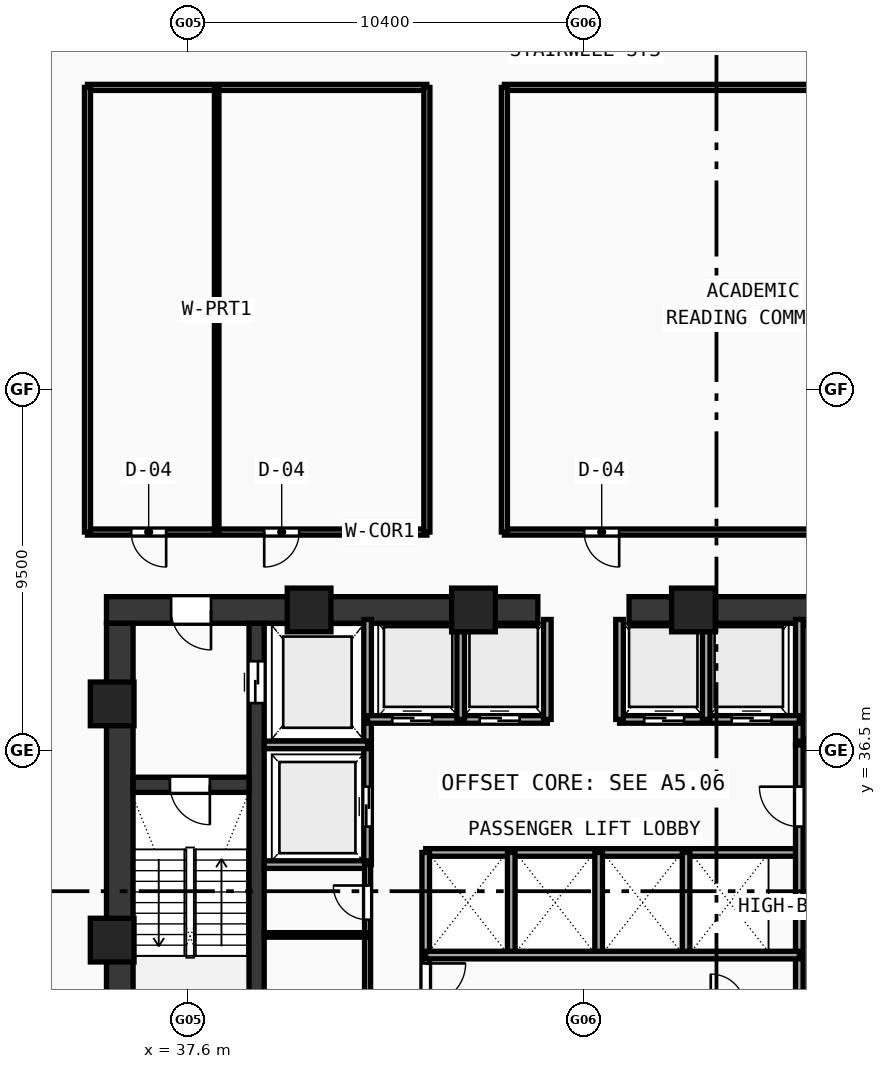
"""IFC4 building model, lengths in metres.
Left out: names, types, materials, properties, quantities, classifications, styles, units other than length and angle.
Written with IfcOpenShell. Run it as: python <this file> out.ifc"""

import sys

from ifc_helpers import new_model, si_unit, direction, frame, frame_2d, origin, origin_with_axes, origin_2d, place, context, subcontext, project, spatial, rectangle, hollow_rectangle, extrude, source, transform, mapped, element, fill, save


model = new_model("IFC4")
c1 = context("Model", 3, precision=1e-05, world=origin(), true_north=direction((0.0, 1.0)))
c2 = subcontext(c1, "Body", "Model", "MODEL_VIEW")
j1 = project(units=[si_unit("LENGTHUNIT", "METRE"), si_unit("PLANEANGLEUNIT", "RADIAN")], contexts=[c1])
p1 = place(None, origin())
s1 = spatial("IfcSite", under=j1, at=p1, CompositionType="ELEMENT")
p2 = place(p1, origin())
s2 = spatial("IfcBuilding", under=s1, at=p2, CompositionType="ELEMENT")
p3 = place(p2, frame((0.0, 0.0, 63.07)))
s3 = spatial("IfcBuildingStorey", under=s2, at=p3, CompositionType="ELEMENT", Elevation=63.07)
p4 = place(p3, frame((35.45, 40.2, 0.0), z_axis=(0.0, 0.0, 1.0), x_axis=(1.0, 0.0, 0.0)))
e1 = element("IfcWall", 1, at=p4, inside=s3, PredefinedType="SHEAR", context=c2, shape_type="SweptSolid", body=[
    extrude(rectangle(XDim=11.35, YDim=0.7, at=frame_2d((5.675, 0.0))), origin(), (0.0, 0.0, 1.0), 3.37),
])
p5 = place(p4, frame((1.7, 0.0, 0.0)))
e2 = element("IfcOpeningElement", 2, at=p5, cuts=e1, PredefinedType="OPENING", context=c2, shape_type="SweptSolid", body=[
    extrude(rectangle(XDim=1.05, YDim=2.1, at=frame_2d((0.525, 1.05))), frame((0.0, 0.36, 0.0), z_axis=(0.0, -1.0, 0.0), x_axis=(1.0, 0.0, 0.0)), (0.0, 0.0, 1.0), 0.72),
])
p6 = place(p3, frame((49.2, 40.2, 0.0), z_axis=(0.0, 0.0, 1.0), x_axis=(1.0, 0.0, 0.0)))
e3 = element("IfcWall", 3, at=p6, inside=s3, PredefinedType="SHEAR", context=c2, shape_type="SweptSolid", body=[
    extrude(rectangle(XDim=11.35, YDim=0.7, at=frame_2d((5.675, 0.0))), origin(), (0.0, 0.0, 1.0), 3.37),
])
p7 = place(p6, frame((8.6, 0.0, 0.0)))
e4 = element("IfcOpeningElement", 4, at=p7, cuts=e3, PredefinedType="OPENING", context=c2, shape_type="SweptSolid", body=[
    extrude(rectangle(XDim=1.05, YDim=2.1, at=frame_2d((0.525, 1.05))), frame((0.0, 0.36, 0.0), z_axis=(0.0, -1.0, 0.0), x_axis=(1.0, 0.0, 0.0)), (0.0, 0.0, 1.0), 0.72),
])
p8 = place(p3, frame((35.8, 27.85, 0.0), z_axis=(0.0, 0.0, 1.0), x_axis=(0.0, 1.0, 0.0)))
e5 = element("IfcWall", 5, at=p8, inside=s3, PredefinedType="SHEAR", context=c2, shape_type="SweptSolid", body=[
    extrude(rectangle(XDim=12.0, YDim=0.7, at=frame_2d((6.0, 0.0))), origin(), (0.0, 0.0, 1.0), 3.37),
])
p9 = place(p3, frame((39.4, 27.85, 0.0), z_axis=(0.0, 0.0, 1.0), x_axis=(0.0, 1.0, 0.0)))
e6 = element("IfcWall", 6, at=p9, inside=s3, PredefinedType="SHEAR", context=c2, shape_type="SweptSolid", body=[
    extrude(rectangle(XDim=12.0, YDim=0.4, at=frame_2d((6.0, 0.0))), origin(), (0.0, 0.0, 1.0), 3.37),
])
p10 = place(p9, frame((9.9, 0.0, 0.0)))
e7 = element("IfcOpeningElement", 7, at=p10, cuts=e6, PredefinedType="OPENING", context=c2, shape_type="SweptSolid", body=[
    extrude(rectangle(XDim=1.1, YDim=2.1, at=frame_2d((0.55, 1.05))), frame((0.0, 0.21, 0.0), z_axis=(0.0, -1.0, 0.0), x_axis=(1.0, 0.0, 0.0)), (0.0, 0.0, 1.0), 0.42),
])
p11 = place(p3, frame((36.15, 35.6, 0.0), z_axis=(0.0, 0.0, 1.0), x_axis=(1.0, 0.0, 0.0)))
e8 = element("IfcWall", 8, at=p11, inside=s3, PredefinedType="SHEAR", context=c2, shape_type="SweptSolid", body=[
    extrude(rectangle(XDim=3.05, YDim=0.4, at=frame_2d((1.525, 0.0))), origin(), (0.0, 0.0, 1.0), 3.37),
])
p12 = place(p11, frame((0.97, 0.0, 0.0)))
e9 = element("IfcOpeningElement", 9, at=p12, cuts=e8, PredefinedType="OPENING", context=c2, shape_type="SweptSolid", body=[
    extrude(rectangle(XDim=1.05, YDim=2.1, at=frame_2d((0.525, 1.05))), frame((0.0, 0.21, 0.0), z_axis=(0.0, -1.0, 0.0), x_axis=(1.0, 0.0, 0.0)), (0.0, 0.0, 1.0), 0.42),
])
m1 = source(origin(), c2, "Body", "SweptSolid", [
    extrude(hollow_rectangle(XDim=1.15, YDim=1.15, WallThickness=0.048, at=origin_2d()), origin(), (0.0, 0.0, 1.0), 3.63),
])
for number, where, z_axis, x_axis in (
    (10, (50.894, 40.2, -0.26), (0.0, 0.0, 1.0), (1.0, 0.0, 0.0)),
    (11, (45.106, 40.2, -0.26), (0.0, 0.0, 1.0), (1.0, 0.0, 0.0)),
    (12, (40.781, 40.2, -0.26), (0.0, 0.0, 1.0), (1.0, 0.0, 0.0)),
    (13, (35.6, 37.729, -0.26), (0.0, 0.0, 1.0), (1.0, 0.0, 0.0)),
    (14, (35.6, 31.513, -0.26), (0.0, 0.0, 1.0), (1.0, 0.0, 0.0)),
):
    element("IfcColumn", number, at=place(p3, frame(where, z_axis=z_axis, x_axis=x_axis)), inside=s3, PredefinedType="COLUMN", context=c2, shape_type="MappedRepresentation", body=[
        mapped(m1, transform((0.0, 0.0, 0.0), scale=1.0)),
    ])
p13 = place(p3, frame((42.32, 33.5, 0.0), z_axis=(0.0, 0.0, 1.0), x_axis=(0.0, 1.0, 0.0)))
e15 = element("IfcWall", 15, at=p13, inside=s3, PredefinedType="SOLIDWALL", context=c2, shape_type="SweptSolid", body=[
    extrude(rectangle(XDim=6.45, YDim=0.2, at=frame_2d((3.225, 0.0))), origin(), (0.0, 0.0, 1.0), 3.37),
])
p14 = place(p13, frame((1.0, 0.0, 0.0)))
e16 = element("IfcOpeningElement", 16, at=p14, cuts=e15, PredefinedType="OPENING", context=c2, shape_type="SweptSolid", body=[
    extrude(rectangle(XDim=1.05, YDim=2.1, at=frame_2d((0.525, 1.05))), frame((0.0, 0.11, 0.0), z_axis=(0.0, -1.0, 0.0), x_axis=(1.0, 0.0, 0.0)), (0.0, 0.0, 1.0), 0.22),
])
for number, where, z_axis, x_axis in (
    (17, (39.6, 36.65, 0.0), (0.0, 0.0, 1.0), (1.0, 0.0, 0.0)),
    (18, (39.6, 33.5, 0.0), (0.0, 0.0, 1.0), (1.0, 0.0, 0.0)),
):
    element("IfcWall", number, at=place(p3, frame(where, z_axis=z_axis, x_axis=x_axis)), inside=s3, PredefinedType="SOLIDWALL", context=c2, shape_type="SweptSolid", body=[
        extrude(rectangle(XDim=2.72, YDim=0.2, at=frame_2d((1.36, 0.0))), origin(), (0.0, 0.0, 1.0), 3.37),
    ])
p15 = place(p3, frame((53.68, 36.65, 0.0), z_axis=(0.0, 0.0, 1.0), x_axis=(0.0, 1.0, 0.0)))
e19 = element("IfcWall", 19, at=p15, inside=s3, PredefinedType="SOLIDWALL", context=c2, shape_type="SweptSolid", body=[
    extrude(rectangle(XDim=3.3, YDim=0.2, at=frame_2d((1.65, 0.0))), origin(), (0.0, 0.0, 1.0), 3.37),
])
p16 = place(p3, frame((53.68, 36.65, 0.0), z_axis=(0.0, 0.0, 1.0), x_axis=(1.0, 0.0, 0.0)))
e20 = element("IfcWall", 20, at=p16, inside=s3, PredefinedType="SOLIDWALL", context=c2, shape_type="SweptSolid", body=[
    extrude(rectangle(XDim=2.72, YDim=0.2, at=frame_2d((1.36, 0.0))), origin(), (0.0, 0.0, 1.0), 3.37),
])
p17 = place(p3, frame((42.32, 37.32, 0.0), z_axis=(0.0, 0.0, 1.0), x_axis=(1.0, 0.0, 0.0)))
e21 = element("IfcWall", 21, at=p17, inside=s3, PredefinedType="SOLIDWALL", context=c2, shape_type="SweptSolid", body=[
    extrude(rectangle(XDim=4.73, YDim=0.2, at=frame_2d((2.365, 0.0))), origin(), (0.0, 0.0, 1.0), 3.37),
])
p18 = place(p17, frame((0.65, 0.0, 0.0)))
e22 = element("IfcOpeningElement", 22, at=p18, cuts=e21, PredefinedType="OPENING", context=c2, shape_type="SweptSolid", body=[
    extrude(rectangle(XDim=1.05, YDim=2.1, at=frame_2d((0.525, 1.05))), frame((0.0, 0.11, 0.0), z_axis=(0.0, -1.0, 0.0), x_axis=(1.0, 0.0, 0.0)), (0.0, 0.0, 1.0), 0.22),
])
p19 = place(p17, frame((2.95, 0.0, 0.0)))
e23 = element("IfcOpeningElement", 23, at=p19, cuts=e21, PredefinedType="OPENING", context=c2, shape_type="SweptSolid", body=[
    extrude(rectangle(XDim=1.05, YDim=2.1, at=frame_2d((0.525, 1.05))), frame((0.0, 0.11, 0.0), z_axis=(0.0, -1.0, 0.0), x_axis=(1.0, 0.0, 0.0)), (0.0, 0.0, 1.0), 0.22),
])
p20 = place(p3, frame((48.95, 37.32, 0.0), z_axis=(0.0, 0.0, 1.0), x_axis=(1.0, 0.0, 0.0)))
e24 = element("IfcWall", 24, at=p20, inside=s3, PredefinedType="SOLIDWALL", context=c2, shape_type="SweptSolid", body=[
    extrude(rectangle(XDim=4.73, YDim=0.2, at=frame_2d((2.365, 0.0))), origin(), (0.0, 0.0, 1.0), 3.37),
])
p21 = place(p20, frame((0.65, 0.0, 0.0)))
e25 = element("IfcOpeningElement", 25, at=p21, cuts=e24, PredefinedType="OPENING", context=c2, shape_type="SweptSolid", body=[
    extrude(rectangle(XDim=1.05, YDim=2.1, at=frame_2d((0.525, 1.05))), frame((0.0, 0.11, 0.0), z_axis=(0.0, -1.0, 0.0), x_axis=(1.0, 0.0, 0.0)), (0.0, 0.0, 1.0), 0.22),
])
p22 = place(p20, frame((2.95, 0.0, 0.0)))
e26 = element("IfcOpeningElement", 26, at=p22, cuts=e24, PredefinedType="OPENING", context=c2, shape_type="SweptSolid", body=[
    extrude(rectangle(XDim=1.05, YDim=2.1, at=frame_2d((0.525, 1.05))), frame((0.0, 0.11, 0.0), z_axis=(0.0, -1.0, 0.0), x_axis=(1.0, 0.0, 0.0)), (0.0, 0.0, 1.0), 0.22),
])
for number, where, z_axis, x_axis in (
    (27, (47.05, 37.32, 0.0), (0.0, 0.0, 1.0), (0.0, 1.0, 0.0)),
    (28, (48.95, 37.32, 0.0), (0.0, 0.0, 1.0), (0.0, 1.0, 0.0)),
    (29, (44.77, 37.32, 0.0), (0.0, 0.0, 1.0), (0.0, 1.0, 0.0)),
    (30, (51.23, 37.32, 0.0), (0.0, 0.0, 1.0), (0.0, 1.0, 0.0)),
):
    element("IfcWall", number, at=place(p3, frame(where, z_axis=z_axis, x_axis=x_axis)), inside=s3, PredefinedType="SOLIDWALL", context=c2, shape_type="SweptSolid", body=[
        extrude(rectangle(XDim=2.63, YDim=0.2, at=frame_2d((1.315, 0.0))), origin(), (0.0, 0.0, 1.0), 3.37),
    ])
p23 = place(p3, frame((43.85, 33.82, 0.0), z_axis=(0.0, 0.0, 1.0), x_axis=(1.0, 0.0, 0.0)))
e31 = element("IfcWall", 31, at=p23, inside=s3, PredefinedType="SOLIDWALL", context=c2, shape_type="SweptSolid", body=[
    extrude(rectangle(XDim=9.83, YDim=0.2, at=frame_2d((4.915, 0.0))), origin(), (0.0, 0.0, 1.0), 3.37),
])
p24 = place(p3, frame((43.85, 27.6, 0.0), z_axis=(0.0, 0.0, 1.0), x_axis=(0.0, 1.0, 0.0)))
e32 = element("IfcWall", 32, at=p24, inside=s3, PredefinedType="SOLIDWALL", context=c2, shape_type="SweptSolid", body=[
    extrude(rectangle(XDim=6.22, YDim=0.2, at=frame_2d((3.11, 0.0))), origin(), (0.0, 0.0, 1.0), 3.37),
])
p25 = place(p24, frame((2.25, 0.0, 0.0)))
e33 = element("IfcOpeningElement", 33, at=p25, cuts=e32, PredefinedType="OPENING", context=c2, shape_type="SweptSolid", body=[
    extrude(rectangle(XDim=1.05, YDim=2.1, at=frame_2d((0.525, 1.05))), frame((0.0, 0.11, 0.0), z_axis=(0.0, -1.0, 0.0), x_axis=(1.0, 0.0, 0.0)), (0.0, 0.0, 1.0), 0.22),
])
p26 = place(p3, frame((53.68, 27.6, 0.0), z_axis=(0.0, 0.0, 1.0), x_axis=(0.0, 1.0, 0.0)))
e34 = element("IfcWall", 34, at=p26, inside=s3, PredefinedType="SOLIDWALL", context=c2, shape_type="SweptSolid", body=[
    extrude(rectangle(XDim=9.05, YDim=0.2, at=frame_2d((4.525, 0.0))), origin(), (0.0, 0.0, 1.0), 3.37),
])
p27 = place(p26, frame((6.9, 0.0, 0.0)))
e35 = element("IfcOpeningElement", 35, at=p27, cuts=e34, PredefinedType="OPENING", context=c2, shape_type="SweptSolid", body=[
    extrude(rectangle(XDim=1.05, YDim=2.1, at=frame_2d((0.525, 1.05))), frame((0.0, 0.11, 0.0), z_axis=(0.0, -1.0, 0.0), x_axis=(1.0, 0.0, 0.0)), (0.0, 0.0, 1.0), 0.22),
])
for number, where, z_axis, x_axis in (
    (36, (46.1, 31.12, 0.0), (0.0, 0.0, 1.0), (0.0, 1.0, 0.0)),
    (37, (48.4, 31.12, 0.0), (0.0, 0.0, 1.0), (0.0, 1.0, 0.0)),
    (38, (50.7, 31.12, 0.0), (0.0, 0.0, 1.0), (0.0, 1.0, 0.0)),
):
    element("IfcWall", number, at=place(p3, frame(where, z_axis=z_axis, x_axis=x_axis)), inside=s3, PredefinedType="SOLIDWALL", context=c2, shape_type="SweptSolid", body=[
        extrude(rectangle(XDim=2.7, YDim=0.2, at=frame_2d((1.35, 0.0))), origin(), (0.0, 0.0, 1.0), 3.37),
    ])
p28 = place(p3, frame((43.85, 31.12, 0.0), z_axis=(0.0, 0.0, 1.0), x_axis=(1.0, 0.0, 0.0)))
e39 = element("IfcWall", 39, at=p28, inside=s3, PredefinedType="SOLIDWALL", context=c2, shape_type="SweptSolid", body=[
    extrude(rectangle(XDim=9.83, YDim=0.2, at=frame_2d((4.915, 0.0))), origin(), (0.0, 0.0, 1.0), 3.37),
])
p29 = place(p3, frame((42.32, 27.6, 0.0), z_axis=(0.0, 0.0, 1.0), x_axis=(0.0, 1.0, 0.0)))
e40 = element("IfcWall", 40, at=p29, inside=s3, PredefinedType="PARTITIONING", context=c2, shape_type="SweptSolid", body=[
    extrude(rectangle(XDim=5.9, YDim=0.16, at=frame_2d((2.95, 0.0))), origin(), (0.0, 0.0, 1.0), 3.37),
])
p30 = place(p29, frame((1.4, 0.0, 0.0)))
e41 = element("IfcOpeningElement", 41, at=p30, cuts=e40, PredefinedType="OPENING", context=c2, shape_type="SweptSolid", body=[
    extrude(rectangle(XDim=0.9, YDim=2.1, at=frame_2d((0.45, 1.05))), frame((0.0, 0.09, 0.0), z_axis=(0.0, -1.0, 0.0), x_axis=(1.0, 0.0, 0.0)), (0.0, 0.0, 1.0), 0.18),
])
p31 = place(p29, frame((4.45, 0.0, 0.0)))
e42 = element("IfcOpeningElement", 42, at=p31, cuts=e40, PredefinedType="OPENING", context=c2, shape_type="SweptSolid", body=[
    extrude(rectangle(XDim=0.9, YDim=2.1, at=frame_2d((0.45, 1.05))), frame((0.0, 0.09, 0.0), z_axis=(0.0, -1.0, 0.0), x_axis=(1.0, 0.0, 0.0)), (0.0, 0.0, 1.0), 0.18),
])
p32 = place(p3, frame((39.6, 31.65, 0.0), z_axis=(0.0, 0.0, 1.0), x_axis=(1.0, 0.0, 0.0)))
e43 = element("IfcWall", 43, at=p32, inside=s3, PredefinedType="PARTITIONING", context=c2, shape_type="SweptSolid", body=[
    extrude(rectangle(XDim=2.72, YDim=0.12, at=frame_2d((1.36, 0.0))), origin(), (0.0, 0.0, 1.0), 3.37),
])
p33 = place(p3, frame((34.95, 42.25, 0.0), z_axis=(0.0, 0.0, 1.0), x_axis=(1.0, 0.0, 0.0)))
e44 = element("IfcWall", 44, at=p33, inside=s3, PredefinedType="PARTITIONING", context=c2, shape_type="SweptSolid", body=[
    extrude(rectangle(XDim=8.93, YDim=0.16, at=frame_2d((4.465, 0.0))), origin(), (0.0, 0.0, 1.0), 2.67),
])
p34 = place(p33, frame((1.15, 0.0, 0.0)))
e45 = element("IfcOpeningElement", 45, at=p34, cuts=e44, PredefinedType="OPENING", context=c2, shape_type="SweptSolid", body=[
    extrude(rectangle(XDim=0.92, YDim=2.1, at=frame_2d((0.46, 1.05))), frame((0.0, 0.09, 0.0), z_axis=(0.0, -1.0, 0.0), x_axis=(1.0, 0.0, 0.0)), (0.0, 0.0, 1.0), 0.18),
])
p35 = place(p33, frame((4.65, 0.0, 0.0)))
e46 = element("IfcOpeningElement", 46, at=p35, cuts=e44, PredefinedType="OPENING", context=c2, shape_type="SweptSolid", body=[
    extrude(rectangle(XDim=0.92, YDim=2.1, at=frame_2d((0.46, 1.05))), frame((0.0, 0.09, 0.0), z_axis=(0.0, -1.0, 0.0), x_axis=(1.0, 0.0, 0.0)), (0.0, 0.0, 1.0), 0.18),
])
p36 = place(p3, frame((34.95, 53.95, 0.0), z_axis=(0.0, 0.0, 1.0), x_axis=(1.0, 0.0, 0.0)))
e47 = element("IfcWall", 47, at=p36, inside=s3, PredefinedType="PARTITIONING", context=c2, shape_type="SweptSolid", body=[
    extrude(rectangle(XDim=8.93, YDim=0.16, at=frame_2d((4.465, 0.0))), origin(), (0.0, 0.0, 1.0), 2.67),
])
for number, where, z_axis, x_axis in (
    (48, (34.95, 42.25, 0.0), (0.0, 0.0, 1.0), (0.0, 1.0, 0.0)),
    (49, (43.88, 42.25, 0.0), (0.0, 0.0, 1.0), (0.0, 1.0, 0.0)),
):
    element("IfcWall", number, at=place(p3, frame(where, z_axis=z_axis, x_axis=x_axis)), inside=s3, PredefinedType="PARTITIONING", context=c2, shape_type="SweptSolid", body=[
        extrude(rectangle(XDim=11.7, YDim=0.16, at=frame_2d((5.85, 0.0))), origin(), (0.0, 0.0, 1.0), 2.67),
    ])
p37 = place(p3, frame((38.35, 42.25, 0.0), z_axis=(0.0, 0.0, 1.0), x_axis=(0.0, 1.0, 0.0)))
e50 = element("IfcWall", 50, at=p37, inside=s3, PredefinedType="PARTITIONING", context=c2, shape_type="SweptSolid", body=[
    extrude(rectangle(XDim=11.7, YDim=0.12, at=frame_2d((5.85, 0.0))), origin(), (0.0, 0.0, 1.0), 2.67),
])
p38 = place(p3, frame((45.92, 42.25, 0.0), z_axis=(0.0, 0.0, 1.0), x_axis=(1.0, 0.0, 0.0)))
e51 = element("IfcWall", 51, at=p38, inside=s3, PredefinedType="PARTITIONING", context=c2, shape_type="SweptSolid", body=[
    extrude(rectangle(XDim=15.78, YDim=0.16, at=frame_2d((7.89, 0.0))), origin(), (0.0, 0.0, 1.0), 2.67),
])
p39 = place(p38, frame((2.1, 0.0, 0.0)))
e52 = element("IfcOpeningElement", 52, at=p39, cuts=e51, PredefinedType="OPENING", context=c2, shape_type="SweptSolid", body=[
    extrude(rectangle(XDim=0.92, YDim=2.1, at=frame_2d((0.46, 1.05))), frame((0.0, 0.09, 0.0), z_axis=(0.0, -1.0, 0.0), x_axis=(1.0, 0.0, 0.0)), (0.0, 0.0, 1.0), 0.18),
])
p40 = place(p38, frame((13.53, 0.0, 0.0)))
e53 = element("IfcOpeningElement", 53, at=p40, cuts=e51, PredefinedType="OPENING", context=c2, shape_type="SweptSolid", body=[
    extrude(rectangle(XDim=0.94, YDim=2.1, at=frame_2d((0.47, 1.05))), frame((0.0, 0.09, 0.0), z_axis=(0.0, -1.0, 0.0), x_axis=(1.0, 0.0, 0.0)), (0.0, 0.0, 1.0), 0.18),
])
p41 = place(p3, frame((45.92, 53.95, 0.0), z_axis=(0.0, 0.0, 1.0), x_axis=(1.0, 0.0, 0.0)))
e54 = element("IfcWall", 54, at=p41, inside=s3, PredefinedType="PARTITIONING", context=c2, shape_type="SweptSolid", body=[
    extrude(rectangle(XDim=15.78, YDim=0.16, at=frame_2d((7.89, 0.0))), origin(), (0.0, 0.0, 1.0), 2.67),
])
p42 = place(p3, frame((45.92, 42.25, 0.0), z_axis=(0.0, 0.0, 1.0), x_axis=(0.0, 1.0, 0.0)))
e55 = element("IfcWall", 55, at=p42, inside=s3, PredefinedType="PARTITIONING", context=c2, shape_type="SweptSolid", body=[
    extrude(rectangle(XDim=11.7, YDim=0.16, at=frame_2d((5.85, 0.0))), origin(), (0.0, 0.0, 1.0), 2.97),
])
m2 = source(origin(), c2, "Body", "SweptSolid", [
    extrude(rectangle(XDim=1.05, YDim=2.1, at=frame_2d((0.525, 1.05))), frame((0.0, 0.025, 0.0), z_axis=(0.0, -1.0, 0.0), x_axis=(1.0, 0.0, 0.0)), (0.0, 0.0, 1.0), 0.05),
])
p43 = place(p12, frame((1.05, 0.0, 0.0), z_axis=(0.0, 0.0, 1.0), x_axis=(-1.0, 0.0, 0.0)))
e56 = element("IfcDoor", 56, at=p43, inside=s3, OperationType="SINGLE_SWING_LEFT", PredefinedType="DOOR", context=c2, shape_type="MappedRepresentation", body=[
    mapped(m2, transform((0.0, 0.0, 0.0), scale=1.0)),
])
fill(e9, e56)
p44 = place(p5, frame((1.05, 0.0, 0.0), z_axis=(0.0, 0.0, 1.0), x_axis=(-1.0, 0.0, 0.0)))
e57 = element("IfcDoor", 57, at=p44, inside=s3, OperationType="SINGLE_SWING_LEFT", PredefinedType="DOOR", context=c2, shape_type="MappedRepresentation", body=[
    mapped(m2, transform((0.0, 0.0, 0.0), scale=1.0)),
])
fill(e2, e57)
m3 = source(origin(), c2, "Body", "SweptSolid", [
    extrude(rectangle(XDim=1.1, YDim=2.1, at=frame_2d((0.55, 1.05))), frame((0.0, 0.025, 0.0), z_axis=(0.0, -1.0, 0.0), x_axis=(1.0, 0.0, 0.0)), (0.0, 0.0, 1.0), 0.05),
])
p45 = place(p10, frame((1.1, 0.0, 0.0), z_axis=(0.0, 0.0, 1.0), x_axis=(-1.0, 0.0, 0.0)))
e58 = element("IfcDoor", 58, at=p45, inside=s3, OperationType="DOUBLE_DOOR_SLIDING", PredefinedType="DOOR", context=c2, shape_type="MappedRepresentation", body=[
    mapped(m3, transform((0.0, 0.0, 0.0), scale=1.0)),
])
fill(e7, e58)
p46 = place(p14, origin_with_axes())
e59 = element("IfcDoor", 59, at=p46, inside=s3, OperationType="DOUBLE_DOOR_SLIDING", PredefinedType="DOOR", context=c2, shape_type="MappedRepresentation", body=[
    mapped(m2, transform((0.0, 0.0, 0.0), scale=1.0)),
])
fill(e16, e59)
p47 = place(p18, frame((1.05, 0.0, 0.0), z_axis=(0.0, 0.0, 1.0), x_axis=(-1.0, 0.0, 0.0)))
e60 = element("IfcDoor", 60, at=p47, inside=s3, OperationType="DOUBLE_DOOR_SLIDING", PredefinedType="DOOR", context=c2, shape_type="MappedRepresentation", body=[
    mapped(m2, transform((0.0, 0.0, 0.0), scale=1.0)),
])
fill(e22, e60)
p48 = place(p19, frame((1.05, 0.0, 0.0), z_axis=(0.0, 0.0, 1.0), x_axis=(-1.0, 0.0, 0.0)))
e61 = element("IfcDoor", 61, at=p48, inside=s3, OperationType="DOUBLE_DOOR_SLIDING", PredefinedType="DOOR", context=c2, shape_type="MappedRepresentation", body=[
    mapped(m2, transform((0.0, 0.0, 0.0), scale=1.0)),
])
fill(e23, e61)
p49 = place(p21, frame((1.05, 0.0, 0.0), z_axis=(0.0, 0.0, 1.0), x_axis=(-1.0, 0.0, 0.0)))
e62 = element("IfcDoor", 62, at=p49, inside=s3, OperationType="DOUBLE_DOOR_SLIDING", PredefinedType="DOOR", context=c2, shape_type="MappedRepresentation", body=[
    mapped(m2, transform((0.0, 0.0, 0.0), scale=1.0)),
])
fill(e25, e62)
p50 = place(p22, frame((1.05, 0.0, 0.0), z_axis=(0.0, 0.0, 1.0), x_axis=(-1.0, 0.0, 0.0)))
e63 = element("IfcDoor", 63, at=p50, inside=s3, OperationType="DOUBLE_DOOR_SLIDING", PredefinedType="DOOR", context=c2, shape_type="MappedRepresentation", body=[
    mapped(m2, transform((0.0, 0.0, 0.0), scale=1.0)),
])
fill(e26, e63)
p51 = place(p25, frame((1.05, 0.0, 0.0), z_axis=(0.0, 0.0, 1.0), x_axis=(-1.0, 0.0, 0.0)))
e64 = element("IfcDoor", 64, at=p51, inside=s3, OperationType="SINGLE_SWING_LEFT", PredefinedType="DOOR", context=c2, shape_type="MappedRepresentation", body=[
    mapped(m2, transform((0.0, 0.0, 0.0), scale=1.0)),
])
fill(e33, e64)
p52 = place(p27, origin_with_axes())
e65 = element("IfcDoor", 65, at=p52, inside=s3, OperationType="SINGLE_SWING_RIGHT", PredefinedType="DOOR", context=c2, shape_type="MappedRepresentation", body=[
    mapped(m2, transform((0.0, 0.0, 0.0), scale=1.0)),
])
fill(e35, e65)
m4 = source(origin(), c2, "Body", "SweptSolid", [
    extrude(rectangle(XDim=0.9, YDim=2.1, at=frame_2d((0.45, 1.05))), frame((0.0, 0.025, 0.0), z_axis=(0.0, -1.0, 0.0), x_axis=(1.0, 0.0, 0.0)), (0.0, 0.0, 1.0), 0.05),
])
p53 = place(p31, origin_with_axes())
e66 = element("IfcDoor", 66, at=p53, inside=s3, OperationType="SINGLE_SWING_RIGHT", PredefinedType="DOOR", context=c2, shape_type="MappedRepresentation", body=[
    mapped(m4, transform((0.0, 0.0, 0.0), scale=1.0)),
])
fill(e42, e66)
m5 = source(origin(), c2, "Body", "SweptSolid", [
    extrude(rectangle(XDim=0.92, YDim=2.1, at=frame_2d((0.46, 1.05))), frame((0.0, 0.025, 0.0), z_axis=(0.0, -1.0, 0.0), x_axis=(1.0, 0.0, 0.0)), (0.0, 0.0, 1.0), 0.05),
])
p54 = place(p34, frame((0.92, 0.0, 0.0), z_axis=(0.0, 0.0, 1.0), x_axis=(-1.0, 0.0, 0.0)))
e67 = element("IfcDoor", 67, at=p54, inside=s3, OperationType="SINGLE_SWING_LEFT", PredefinedType="DOOR", context=c2, shape_type="MappedRepresentation", body=[
    mapped(m5, transform((0.0, 0.0, 0.0), scale=1.0)),
])
fill(e45, e67)
p55 = place(p35, frame((0.92, 0.0, 0.0), z_axis=(0.0, 0.0, 1.0), x_axis=(-1.0, 0.0, 0.0)))
e68 = element("IfcDoor", 68, at=p55, inside=s3, OperationType="SINGLE_SWING_RIGHT", PredefinedType="DOOR", context=c2, shape_type="MappedRepresentation", body=[
    mapped(m5, transform((0.0, 0.0, 0.0), scale=1.0)),
])
fill(e46, e68)
p56 = place(p39, frame((0.92, 0.0, 0.0), z_axis=(0.0, 0.0, 1.0), x_axis=(-1.0, 0.0, 0.0)))
e69 = element("IfcDoor", 69, at=p56, inside=s3, OperationType="SINGLE_SWING_LEFT", PredefinedType="DOOR", context=c2, shape_type="MappedRepresentation", body=[
    mapped(m5, transform((0.0, 0.0, 0.0), scale=1.0)),
])
fill(e52, e69)
save(model, sys.argv[1])
